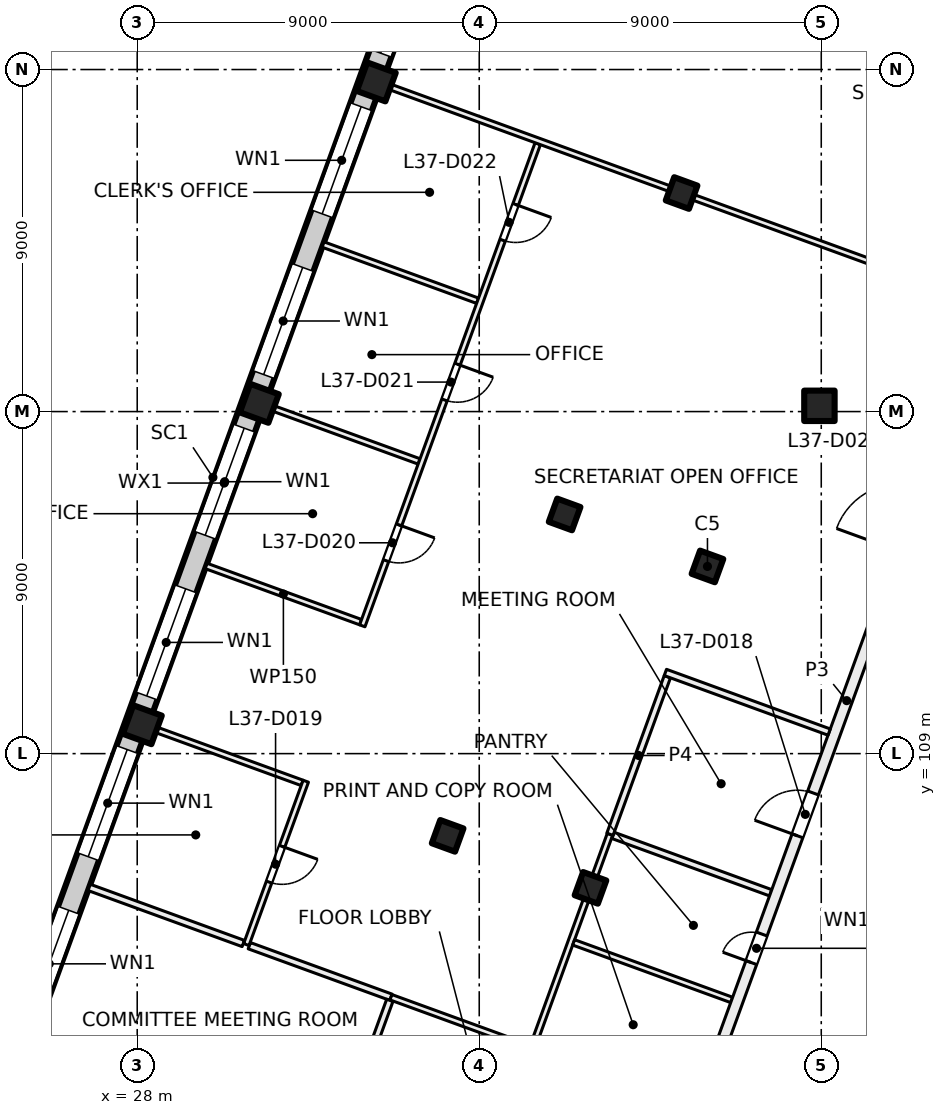
"""IFC4 building model, lengths in metres.
Left out: names, types, materials, properties, quantities, classifications, styles, units other than length and angle.
Written with IfcOpenShell. Run it as: python <this file> out.ifc"""

import sys

from ifc_helpers import new_model, si_unit, direction, frame, frame_2d, origin, origin_2d, place, context, subcontext, project, spatial, rectangle, extrude, element, fill, save


model = new_model("IFC4")
c1 = context("Model", 3, precision=1e-05, world=origin(), true_north=direction((0.0, 1.0)))
c2 = subcontext(c1, "Body", "Model", "MODEL_VIEW")
j1 = project(units=[si_unit("LENGTHUNIT", "METRE"), si_unit("PLANEANGLEUNIT", "RADIAN")], contexts=[c1])
p1 = place(None, origin())
s1 = spatial("IfcSite", under=j1, at=p1, CompositionType="ELEMENT")
p2 = place(p1, origin())
s2 = spatial("IfcBuilding", under=s1, at=p2, CompositionType="ELEMENT")
p3 = place(p2, frame((0.0, 0.0, 158.5)))
s3 = spatial("IfcBuildingStorey", under=s2, at=p3, CompositionType="ELEMENT", Elevation=158.5)
p4 = place(p3, frame((45.952, 118.152, 0.0), z_axis=(0.0, 0.0, 1.0), x_axis=(1.0, 0.0, 0.0)))
e1 = element("IfcColumn", 1, at=p4, inside=s3, PredefinedType="COLUMN", context=c2, shape_type="SweptSolid", body=[
    extrude(rectangle(XDim=0.8, YDim=0.8, at=origin_2d()), origin(), (0.0, 0.0, 1.0), 4.0),
])
for number, where, z_axis, x_axis in (
    (2, (43.006, 113.925, 0.0), (0.0, 0.0, 1.0), (-0.342, -0.94, 0.0)),
    (3, (39.927, 105.468, 0.0), (0.0, 0.0, 1.0), (-0.342, -0.94, 0.0)),
    (4, (42.325, 123.751, 0.0), (0.0, 0.0, 1.0), (-0.342, -0.94, 0.0)),
    (5, (39.247, 115.293, 0.0), (0.0, 0.0, 1.0), (-0.342, -0.94, 0.0)),
    (6, (36.169, 106.836, 0.0), (0.0, 0.0, 1.0), (-0.342, -0.94, 0.0)),
):
    element("IfcColumn", number, at=place(p3, frame(where, z_axis=z_axis, x_axis=x_axis)), inside=s3, PredefinedType="COLUMN", context=c2, shape_type="SweptSolid", body=[
        extrude(rectangle(XDim=0.65, YDim=0.65, at=origin_2d()), origin(), (0.0, 0.0, 1.0), 4.0),
    ])
for number, where, z_axis, x_axis in (
    (7, (34.291, 126.675, 0.0), (0.0, 0.0, 1.0), (-0.342, -0.94, 0.0)),
    (8, (31.212, 118.218, 0.0), (0.0, 0.0, 1.0), (-0.342, -0.94, 0.0)),
    (9, (28.134, 109.76, 0.0), (0.0, 0.0, 1.0), (-0.342, -0.94, 0.0)),
):
    element("IfcColumn", number, at=place(p3, frame(where, z_axis=z_axis, x_axis=x_axis)), inside=s3, PredefinedType="COLUMN", context=c2, shape_type="SweptSolid", body=[
        extrude(rectangle(XDim=0.8, YDim=0.8, at=origin_2d()), origin(), (0.0, 0.0, 1.0), 4.0),
    ])
p5 = place(p3, frame((52.212, 113.783, 0.0), z_axis=(0.0, 0.0, 1.0), x_axis=(-0.34202521188, -0.939690775968, 0.0)))
e10 = element("IfcWall", 10, at=p5, inside=s3, PredefinedType="SOLIDWALL", context=c2, shape_type="SweptSolid", body=[
    extrude(rectangle(XDim=21.745, YDim=0.6, at=frame_2d((10.873, 0.0))), origin(), (0.0, 0.0, 1.0), 3.625),
])
p6 = place(p5, frame((3.765, 0.0, 0.9)))
e11 = element("IfcOpeningElement", 11, at=p6, cuts=e10, PredefinedType="OPENING", context=c2, shape_type="SweptSolid", body=[
    extrude(rectangle(XDim=3.0, YDim=2.4, at=frame_2d((1.5, 1.2))), frame((0.0, 0.31, 0.0), z_axis=(0.0, -1.0, 0.0), x_axis=(1.0, 0.0, 0.0)), (0.0, 0.0, 1.0), 0.62),
])
p7 = place(p5, frame((8.265, 0.0, 0.9)))
e12 = element("IfcOpeningElement", 12, at=p7, cuts=e10, PredefinedType="OPENING", context=c2, shape_type="SweptSolid", body=[
    extrude(rectangle(XDim=3.0, YDim=2.4, at=frame_2d((1.5, 1.2))), frame((0.0, 0.31, 0.0), z_axis=(0.0, -1.0, 0.0), x_axis=(1.0, 0.0, 0.0)), (0.0, 0.0, 1.0), 0.62),
])
p8 = place(p5, frame((12.765, 0.0, 0.9)))
e13 = element("IfcOpeningElement", 13, at=p8, cuts=e10, PredefinedType="OPENING", context=c2, shape_type="SweptSolid", body=[
    extrude(rectangle(XDim=3.0, YDim=2.4, at=frame_2d((1.5, 1.2))), frame((0.0, 0.31, 0.0), z_axis=(0.0, -1.0, 0.0), x_axis=(1.0, 0.0, 0.0)), (0.0, 0.0, 1.0), 0.62),
])
p9 = place(p5, frame((17.265, 0.0, 0.9)))
e14 = element("IfcOpeningElement", 14, at=p9, cuts=e10, PredefinedType="OPENING", context=c2, shape_type="SweptSolid", body=[
    extrude(rectangle(XDim=3.0, YDim=2.4, at=frame_2d((1.5, 1.2))), frame((0.0, 0.31, 0.0), z_axis=(0.0, -1.0, 0.0), x_axis=(1.0, 0.0, 0.0)), (0.0, 0.0, 1.0), 0.62),
])
p10 = place(p3, frame((24.666, 100.669, 0.0), z_axis=(0.0, 0.0, 1.0), x_axis=(0.34201964167, 0.939692803373, 0.0)))
e15 = element("IfcWall", 15, at=p10, inside=s3, PredefinedType="SOLIDWALL", context=c2, shape_type="SweptSolid", body=[
    extrude(rectangle(XDim=32.884, YDim=0.6, at=frame_2d((16.442, 0.0))), origin(), (0.0, 0.0, 1.0), 3.625),
])
p11 = place(p10, frame((1.48, 0.0, 0.9)))
e16 = element("IfcOpeningElement", 16, at=p11, cuts=e15, PredefinedType="OPENING", context=c2, shape_type="SweptSolid", body=[
    extrude(rectangle(XDim=3.0, YDim=2.4, at=frame_2d((1.5, 1.2))), frame((0.0, 0.31, 0.0), z_axis=(0.0, -1.0, 0.0), x_axis=(1.0, 0.0, 0.0)), (0.0, 0.0, 1.0), 0.62),
])
p12 = place(p10, frame((5.98, 0.0, 0.9)))
e17 = element("IfcOpeningElement", 17, at=p12, cuts=e15, PredefinedType="OPENING", context=c2, shape_type="SweptSolid", body=[
    extrude(rectangle(XDim=3.0, YDim=2.4, at=frame_2d((1.5, 1.2))), frame((0.0, 0.31, 0.0), z_axis=(0.0, -1.0, 0.0), x_axis=(1.0, 0.0, 0.0)), (0.0, 0.0, 1.0), 0.62),
])
p13 = place(p10, frame((10.48, 0.0, 0.9)))
e18 = element("IfcOpeningElement", 18, at=p13, cuts=e15, PredefinedType="OPENING", context=c2, shape_type="SweptSolid", body=[
    extrude(rectangle(XDim=3.0, YDim=2.4, at=frame_2d((1.5, 1.2))), frame((0.0, 0.31, 0.0), z_axis=(0.0, -1.0, 0.0), x_axis=(1.0, 0.0, 0.0)), (0.0, 0.0, 1.0), 0.62),
])
p14 = place(p10, frame((14.98, 0.0, 0.9)))
e19 = element("IfcOpeningElement", 19, at=p14, cuts=e15, PredefinedType="OPENING", context=c2, shape_type="SweptSolid", body=[
    extrude(rectangle(XDim=3.0, YDim=2.4, at=frame_2d((1.5, 1.2))), frame((0.0, 0.31, 0.0), z_axis=(0.0, -1.0, 0.0), x_axis=(1.0, 0.0, 0.0)), (0.0, 0.0, 1.0), 0.62),
])
p15 = place(p10, frame((19.48, 0.0, 0.9)))
e20 = element("IfcOpeningElement", 20, at=p15, cuts=e15, PredefinedType="OPENING", context=c2, shape_type="SweptSolid", body=[
    extrude(rectangle(XDim=3.0, YDim=2.4, at=frame_2d((1.5, 1.2))), frame((0.0, 0.31, 0.0), z_axis=(0.0, -1.0, 0.0), x_axis=(1.0, 0.0, 0.0)), (0.0, 0.0, 1.0), 0.62),
])
p16 = place(p10, frame((23.98, 0.0, 0.9)))
e21 = element("IfcOpeningElement", 21, at=p16, cuts=e15, PredefinedType="OPENING", context=c2, shape_type="SweptSolid", body=[
    extrude(rectangle(XDim=3.0, YDim=2.4, at=frame_2d((1.5, 1.2))), frame((0.0, 0.31, 0.0), z_axis=(0.0, -1.0, 0.0), x_axis=(1.0, 0.0, 0.0)), (0.0, 0.0, 1.0), 0.62),
])
p17 = place(p10, frame((28.48, 0.0, 0.9)))
e22 = element("IfcOpeningElement", 22, at=p17, cuts=e15, PredefinedType="OPENING", context=c2, shape_type="SweptSolid", body=[
    extrude(rectangle(XDim=3.0, YDim=2.4, at=frame_2d((1.5, 1.2))), frame((0.0, 0.31, 0.0), z_axis=(0.0, -1.0, 0.0), x_axis=(1.0, 0.0, 0.0)), (0.0, 0.0, 1.0), 0.62),
])
p18 = place(p3, frame((26.736, 105.48, 0.0), z_axis=(0.0, 0.0, 1.0), x_axis=(0.939677739056, -0.342061027776, 0.0)))
e23 = element("IfcWall", 23, at=p18, inside=s3, PredefinedType="PARTITIONING", context=c2, shape_type="SweptSolid", body=[
    extrude(rectangle(XDim=4.315, YDim=0.175, at=frame_2d((2.158, 0.0))), origin(), (0.0, 0.0, 1.0), 3.625),
])
p19 = place(p3, frame((28.275, 109.709, 0.0), z_axis=(0.0, 0.0, 1.0), x_axis=(0.939737385516, -0.341897128188, 0.0)))
e24 = element("IfcWall", 24, at=p19, inside=s3, PredefinedType="PARTITIONING", context=c2, shape_type="SweptSolid", body=[
    extrude(rectangle(XDim=4.326, YDim=0.15, at=frame_2d((2.163, 0.0))), origin(), (0.0, 0.0, 1.0), 3.625),
])
p20 = place(p3, frame((30.95, 103.946, 0.0), z_axis=(0.0, 0.0, 1.0), x_axis=(0.939739492658, -0.341891336449, 0.0)))
e25 = element("IfcWall", 25, at=p20, inside=s3, PredefinedType="PARTITIONING", context=c2, shape_type="SweptSolid", body=[
    extrude(rectangle(XDim=3.966, YDim=0.175, at=frame_2d((1.983, 0.0))), origin(), (0.0, 0.0, 1.0), 3.625),
])
p21 = place(p3, frame((31.353, 118.166, 0.0), z_axis=(0.0, 0.0, 1.0), x_axis=(0.939803311208, -0.341715870634, 0.0)))
e26 = element("IfcWall", 26, at=p21, inside=s3, PredefinedType="PARTITIONING", context=c2, shape_type="SweptSolid", body=[
    extrude(rectangle(XDim=4.325, YDim=0.15, at=frame_2d((2.163, 0.0))), origin(), (0.0, 0.0, 1.0), 3.625),
])
p22 = place(p3, frame((32.436, 108.274, 0.0), z_axis=(0.0, 0.0, 1.0), x_axis=(-0.342145890874, -0.939646842893, 0.0)))
e27 = element("IfcWall", 27, at=p22, inside=s3, PredefinedType="PARTITIONING", context=c2, shape_type="SweptSolid", body=[
    extrude(rectangle(XDim=4.574, YDim=0.15, at=frame_2d((2.287, 0.0))), origin(), (0.0, 0.0, 1.0), 3.625),
])
p23 = place(p22, frame((1.824, 0.0, 0.0)))
e28 = element("IfcOpeningElement", 28, at=p23, cuts=e27, PredefinedType="OPENING", context=c2, shape_type="SweptSolid", body=[
    extrude(rectangle(XDim=1.0, YDim=2.1, at=frame_2d((0.5, 1.05))), frame((0.0, 0.085, 0.0), z_axis=(0.0, -1.0, 0.0), x_axis=(1.0, 0.0, 0.0)), (0.0, 0.0, 1.0), 0.17),
])
for number, where, z_axis, x_axis in (
    (29, (32.892, 122.395, 0.0), (0.0, 0.0, 1.0), (0.94, -0.342, 0.0)),
    (30, (33.879, 112.459, 0.0), (0.0, 0.0, 1.0), (-0.94, 0.342, 0.0)),
):
    element("IfcWall", number, at=place(p3, frame(where, z_axis=z_axis, x_axis=x_axis)), inside=s3, PredefinedType="PARTITIONING", context=c2, shape_type="SweptSolid", body=[
        extrude(rectangle(XDim=4.326, YDim=0.15, at=frame_2d((2.163, 0.0))), origin(), (0.0, 0.0, 1.0), 3.625),
    ])
p24 = place(p3, frame((38.54, 125.049, 0.0), z_axis=(0.0, 0.0, 1.0), x_axis=(-0.341994252555, -0.939702043852, 0.0)))
e31 = element("IfcWall", 31, at=p24, inside=s3, PredefinedType="PARTITIONING", context=c2, shape_type="SweptSolid", body=[
    extrude(rectangle(XDim=13.5, YDim=0.15, at=frame_2d((6.75, 0.0))), origin(), (0.0, 0.0, 1.0), 3.625),
])
p25 = place(p24, frame((10.675, 0.0, 0.0)))
e32 = element("IfcOpeningElement", 32, at=p25, cuts=e31, PredefinedType="OPENING", context=c2, shape_type="SweptSolid", body=[
    extrude(rectangle(XDim=1.0, YDim=2.1, at=frame_2d((0.5, 1.05))), frame((0.0, 0.085, 0.0), z_axis=(0.0, -1.0, 0.0), x_axis=(1.0, 0.0, 0.0)), (0.0, 0.0, 1.0), 0.17),
])
p26 = place(p24, frame((6.176, 0.0, 0.0)))
e33 = element("IfcOpeningElement", 33, at=p26, cuts=e31, PredefinedType="OPENING", context=c2, shape_type="SweptSolid", body=[
    extrude(rectangle(XDim=1.0, YDim=2.1, at=frame_2d((0.5, 1.05))), frame((0.0, 0.085, 0.0), z_axis=(0.0, -1.0, 0.0), x_axis=(1.0, 0.0, 0.0)), (0.0, 0.0, 1.0), 0.17),
])
p27 = place(p24, frame((1.703, 0.0, 0.0)))
e34 = element("IfcOpeningElement", 34, at=p27, cuts=e31, PredefinedType="OPENING", context=c2, shape_type="SweptSolid", body=[
    extrude(rectangle(XDim=1.0, YDim=2.1, at=frame_2d((0.5, 1.05))), frame((0.0, 0.085, 0.0), z_axis=(0.0, -1.0, 0.0), x_axis=(1.0, 0.0, 0.0)), (0.0, 0.0, 1.0), 0.17),
])
p28 = place(p3, frame((34.432, 126.624, 0.0), z_axis=(0.0, 0.0, 1.0), x_axis=(0.939664702396, -0.342096838733, 0.0)))
e35 = element("IfcWall", 35, at=p28, inside=s3, PredefinedType="PARTITIONING", context=c2, shape_type="SweptSolid", body=[
    extrude(rectangle(XDim=16.899, YDim=0.15, at=frame_2d((8.449, 0.0))), origin(), (0.0, 0.0, 1.0), 3.625),
])
p29 = place(p3, frame((32.881, 97.657, 0.0), z_axis=(0.0, 0.0, 1.0), x_axis=(0.342058204353, 0.939678766832, 0.0)))
e36 = element("IfcWall", 36, at=p29, inside=s3, PredefinedType="PARTITIONING", context=c2, shape_type="SweptSolid", body=[
    extrude(rectangle(XDim=5.163, YDim=0.175, at=frame_2d((2.581, 0.0))), origin(), (0.0, 0.0, 1.0), 3.625),
])
p30 = place(p29, frame((1.991, 0.0, 0.0)))
e37 = element("IfcOpeningElement", 37, at=p30, cuts=e36, PredefinedType="OPENING", context=c2, shape_type="SweptSolid", body=[
    extrude(rectangle(XDim=1.2, YDim=2.1, at=frame_2d((0.6, 1.05))), frame((0.0, 0.097, 0.0), z_axis=(0.0, -1.0, 0.0), x_axis=(1.0, 0.0, 0.0)), (0.0, 0.0, 1.0), 0.195),
])
p31 = place(p3, frame((34.677, 102.59, 0.0), z_axis=(0.0, 0.0, 1.0), x_axis=(0.939683705252, -0.342044637561, 0.0)))
e38 = element("IfcWall", 38, at=p31, inside=s3, PredefinedType="PARTITIONING", context=c2, shape_type="SweptSolid", body=[
    extrude(rectangle(XDim=8.45, YDim=0.15, at=frame_2d((4.225, 0.0))), origin(), (0.0, 0.0, 1.0), 3.625),
])
p32 = place(p3, frame((38.414, 101.309, 0.0), z_axis=(0.0, 0.0, 1.0), x_axis=(0.34186876189, 0.939747705315, 0.0)))
e39 = element("IfcWall", 39, at=p32, inside=s3, PredefinedType="PARTITIONING", context=c2, shape_type="SweptSolid", body=[
    extrude(rectangle(XDim=5.926, YDim=0.15, at=frame_2d((2.963, 0.0))), origin(), (0.0, 0.0, 1.0), 3.625),
])
p33 = place(p3, frame((39.484, 104.033, 0.0), z_axis=(0.0, 0.0, 1.0), x_axis=(0.939685474739, -0.342039776289, 0.0)))
e40 = element("IfcWall", 40, at=p33, inside=s3, PredefinedType="PARTITIONING", context=c2, shape_type="SweptSolid", body=[
    extrude(rectangle(XDim=4.426, YDim=0.15, at=frame_2d((2.213, 0.0))), origin(), (0.0, 0.0, 1.0), 3.625),
])
p34 = place(p3, frame((40.522, 106.848, 0.0), z_axis=(0.0, 0.0, 1.0), x_axis=(0.939646357962, -0.342147222654, 0.0)))
e41 = element("IfcWall", 41, at=p34, inside=s3, PredefinedType="PARTITIONING", context=c2, shape_type="SweptSolid", body=[
    extrude(rectangle(XDim=4.413, YDim=0.175, at=frame_2d((2.207, 0.0))), origin(), (0.0, 0.0, 1.0), 3.625),
])
p35 = place(p3, frame((41.95, 111.024, 0.0), z_axis=(0.0, 0.0, 1.0), x_axis=(-0.342218375959, -0.939620446327, 0.0)))
e42 = element("IfcWall", 42, at=p35, inside=s3, PredefinedType="PARTITIONING", context=c2, shape_type="SweptSolid", body=[
    extrude(rectangle(XDim=4.412, YDim=0.175, at=frame_2d((2.206, 0.0))), origin(), (0.0, 0.0, 1.0), 3.625),
])
p36 = place(p3, frame((42.732, 99.579, 0.0), z_axis=(0.0, 0.0, 1.0), x_axis=(0.342036000593, 0.939686849061, 0.0)))
e43 = element("IfcWall", 43, at=p36, inside=s3, PredefinedType="PARTITIONING", context=c2, shape_type="SweptSolid", body=[
    extrude(rectangle(XDim=23.018, YDim=0.3, at=frame_2d((11.509, 0.0))), origin(), (0.0, 0.0, 1.0), 3.625),
])
p37 = place(p36, frame((1.175, 0.0, 0.0)))
e44 = element("IfcOpeningElement", 44, at=p37, cuts=e43, PredefinedType="OPENING", context=c2, shape_type="SweptSolid", body=[
    extrude(rectangle(XDim=0.8, YDim=2.1, at=frame_2d((0.4, 1.05))), frame((0.0, 0.16, 0.0), z_axis=(0.0, -1.0, 0.0), x_axis=(1.0, 0.0, 0.0)), (0.0, 0.0, 1.0), 0.32),
])
p38 = place(p36, frame((4.175, 0.0, 0.0)))
e45 = element("IfcOpeningElement", 45, at=p38, cuts=e43, PredefinedType="OPENING", context=c2, shape_type="SweptSolid", body=[
    extrude(rectangle(XDim=0.8, YDim=2.1, at=frame_2d((0.4, 1.05))), frame((0.0, 0.16, 0.0), z_axis=(0.0, -1.0, 0.0), x_axis=(1.0, 0.0, 0.0)), (0.0, 0.0, 1.0), 0.32),
])
p39 = place(p36, frame((7.725, 0.0, 0.0)))
e46 = element("IfcOpeningElement", 46, at=p39, cuts=e43, PredefinedType="OPENING", context=c2, shape_type="SweptSolid", body=[
    extrude(rectangle(XDim=1.2, YDim=2.1, at=frame_2d((0.6, 1.05))), frame((0.0, 0.16, 0.0), z_axis=(0.0, -1.0, 0.0), x_axis=(1.0, 0.0, 0.0)), (0.0, 0.0, 1.0), 0.32),
])
p40 = place(p36, frame((15.675, 0.0, 0.0)))
e47 = element("IfcOpeningElement", 47, at=p40, cuts=e43, PredefinedType="OPENING", context=c2, shape_type="SweptSolid", body=[
    extrude(rectangle(XDim=1.8, YDim=2.1, at=frame_2d((0.9, 1.05))), frame((0.0, 0.16, 0.0), z_axis=(0.0, -1.0, 0.0), x_axis=(1.0, 0.0, 0.0)), (0.0, 0.0, 1.0), 0.32),
])
p41 = place(p3, frame((46.208, 109.567, 0.0), z_axis=(0.0, 0.0, 1.0), x_axis=(-0.939667480086, 0.342089208934, 0.0)))
e48 = element("IfcWall", 48, at=p41, inside=s3, PredefinedType="PARTITIONING", context=c2, shape_type="SweptSolid", body=[
    extrude(rectangle(XDim=4.587, YDim=0.175, at=frame_2d((2.293, 0.0))), origin(), (0.0, 0.0, 1.0), 3.625),
])
p42 = place(p8, origin())
e49 = element("IfcWindow", 49, at=p42, inside=s3, PartitioningType="SINGLE_PANEL", PredefinedType="WINDOW", context=c2, shape_type="SweptSolid", body=[
    extrude(rectangle(XDim=3.0, YDim=2.4, at=frame_2d((1.5, 1.2))), frame((0.0, 0.03, 0.0), z_axis=(0.0, -1.0, 0.0), x_axis=(1.0, 0.0, 0.0)), (0.0, 0.0, 1.0), 0.06),
])
fill(e13, e49)
p43 = place(p11, origin())
e50 = element("IfcWindow", 50, at=p43, inside=s3, PartitioningType="SINGLE_PANEL", PredefinedType="WINDOW", context=c2, shape_type="SweptSolid", body=[
    extrude(rectangle(XDim=3.0, YDim=2.4, at=frame_2d((1.5, 1.2))), frame((0.0, 0.03, 0.0), z_axis=(0.0, -1.0, 0.0), x_axis=(1.0, 0.0, 0.0)), (0.0, 0.0, 1.0), 0.06),
])
fill(e16, e50)
p44 = place(p12, origin())
e51 = element("IfcWindow", 51, at=p44, inside=s3, PartitioningType="SINGLE_PANEL", PredefinedType="WINDOW", context=c2, shape_type="SweptSolid", body=[
    extrude(rectangle(XDim=3.0, YDim=2.4, at=frame_2d((1.5, 1.2))), frame((0.0, 0.03, 0.0), z_axis=(0.0, -1.0, 0.0), x_axis=(1.0, 0.0, 0.0)), (0.0, 0.0, 1.0), 0.06),
])
fill(e17, e51)
p45 = place(p13, origin())
e52 = element("IfcWindow", 52, at=p45, inside=s3, PartitioningType="SINGLE_PANEL", PredefinedType="WINDOW", context=c2, shape_type="SweptSolid", body=[
    extrude(rectangle(XDim=3.0, YDim=2.4, at=frame_2d((1.5, 1.2))), frame((0.0, 0.03, 0.0), z_axis=(0.0, -1.0, 0.0), x_axis=(1.0, 0.0, 0.0)), (0.0, 0.0, 1.0), 0.06),
])
fill(e18, e52)
p46 = place(p14, origin())
e53 = element("IfcWindow", 53, at=p46, inside=s3, PartitioningType="SINGLE_PANEL", PredefinedType="WINDOW", context=c2, shape_type="SweptSolid", body=[
    extrude(rectangle(XDim=3.0, YDim=2.4, at=frame_2d((1.5, 1.2))), frame((0.0, 0.03, 0.0), z_axis=(0.0, -1.0, 0.0), x_axis=(1.0, 0.0, 0.0)), (0.0, 0.0, 1.0), 0.06),
])
fill(e19, e53)
p47 = place(p15, origin())
e54 = element("IfcWindow", 54, at=p47, inside=s3, PartitioningType="SINGLE_PANEL", PredefinedType="WINDOW", context=c2, shape_type="SweptSolid", body=[
    extrude(rectangle(XDim=3.0, YDim=2.4, at=frame_2d((1.5, 1.2))), frame((0.0, 0.03, 0.0), z_axis=(0.0, -1.0, 0.0), x_axis=(1.0, 0.0, 0.0)), (0.0, 0.0, 1.0), 0.06),
])
fill(e20, e54)
p48 = place(p16, origin())
e55 = element("IfcWindow", 55, at=p48, inside=s3, PartitioningType="SINGLE_PANEL", PredefinedType="WINDOW", context=c2, shape_type="SweptSolid", body=[
    extrude(rectangle(XDim=3.0, YDim=2.4, at=frame_2d((1.5, 1.2))), frame((0.0, 0.03, 0.0), z_axis=(0.0, -1.0, 0.0), x_axis=(1.0, 0.0, 0.0)), (0.0, 0.0, 1.0), 0.06),
])
fill(e21, e55)
p49 = place(p17, origin())
e56 = element("IfcWindow", 56, at=p49, inside=s3, PartitioningType="SINGLE_PANEL", PredefinedType="WINDOW", context=c2, shape_type="SweptSolid", body=[
    extrude(rectangle(XDim=3.0, YDim=2.4, at=frame_2d((1.5, 1.2))), frame((0.0, 0.03, 0.0), z_axis=(0.0, -1.0, 0.0), x_axis=(1.0, 0.0, 0.0)), (0.0, 0.0, 1.0), 0.06),
])
fill(e22, e56)
p50 = place(p38, origin())
e57 = element("IfcDoor", 57, at=p50, inside=s3, OperationType="SINGLE_SWING_LEFT", PredefinedType="DOOR", context=c2, shape_type="SweptSolid", body=[
    extrude(rectangle(XDim=0.8, YDim=2.1, at=frame_2d((0.4, 1.05))), frame((0.0, 0.025, 0.0), z_axis=(0.0, -1.0, 0.0), x_axis=(1.0, 0.0, 0.0)), (0.0, 0.0, 1.0), 0.05),
])
fill(e45, e57)
p51 = place(p39, origin())
e58 = element("IfcDoor", 58, at=p51, inside=s3, OperationType="DOUBLE_DOOR_SINGLE_SWING", PredefinedType="DOOR", context=c2, shape_type="SweptSolid", body=[
    extrude(rectangle(XDim=1.2, YDim=2.1, at=frame_2d((0.6, 1.05))), frame((0.0, 0.025, 0.0), z_axis=(0.0, -1.0, 0.0), x_axis=(1.0, 0.0, 0.0)), (0.0, 0.0, 1.0), 0.05),
])
fill(e46, e58)
p52 = place(p23, origin())
e59 = element("IfcDoor", 59, at=p52, inside=s3, OperationType="SINGLE_SWING_LEFT", PredefinedType="DOOR", context=c2, shape_type="SweptSolid", body=[
    extrude(rectangle(XDim=1.0, YDim=2.1, at=frame_2d((0.5, 1.05))), frame((0.0, 0.025, 0.0), z_axis=(0.0, -1.0, 0.0), x_axis=(1.0, 0.0, 0.0)), (0.0, 0.0, 1.0), 0.05),
])
fill(e28, e59)
p53 = place(p25, origin())
e60 = element("IfcDoor", 60, at=p53, inside=s3, OperationType="SINGLE_SWING_LEFT", PredefinedType="DOOR", context=c2, shape_type="SweptSolid", body=[
    extrude(rectangle(XDim=1.0, YDim=2.1, at=frame_2d((0.5, 1.05))), frame((0.0, 0.025, 0.0), z_axis=(0.0, -1.0, 0.0), x_axis=(1.0, 0.0, 0.0)), (0.0, 0.0, 1.0), 0.05),
])
fill(e32, e60)
p54 = place(p26, origin())
e61 = element("IfcDoor", 61, at=p54, inside=s3, OperationType="SINGLE_SWING_LEFT", PredefinedType="DOOR", context=c2, shape_type="SweptSolid", body=[
    extrude(rectangle(XDim=1.0, YDim=2.1, at=frame_2d((0.5, 1.05))), frame((0.0, 0.025, 0.0), z_axis=(0.0, -1.0, 0.0), x_axis=(1.0, 0.0, 0.0)), (0.0, 0.0, 1.0), 0.05),
])
fill(e33, e61)
p55 = place(p27, origin())
e62 = element("IfcDoor", 62, at=p55, inside=s3, OperationType="SINGLE_SWING_LEFT", PredefinedType="DOOR", context=c2, shape_type="SweptSolid", body=[
    extrude(rectangle(XDim=1.0, YDim=2.1, at=frame_2d((0.5, 1.05))), frame((0.0, 0.025, 0.0), z_axis=(0.0, -1.0, 0.0), x_axis=(1.0, 0.0, 0.0)), (0.0, 0.0, 1.0), 0.05),
])
fill(e34, e62)
save(model, sys.argv[1])
